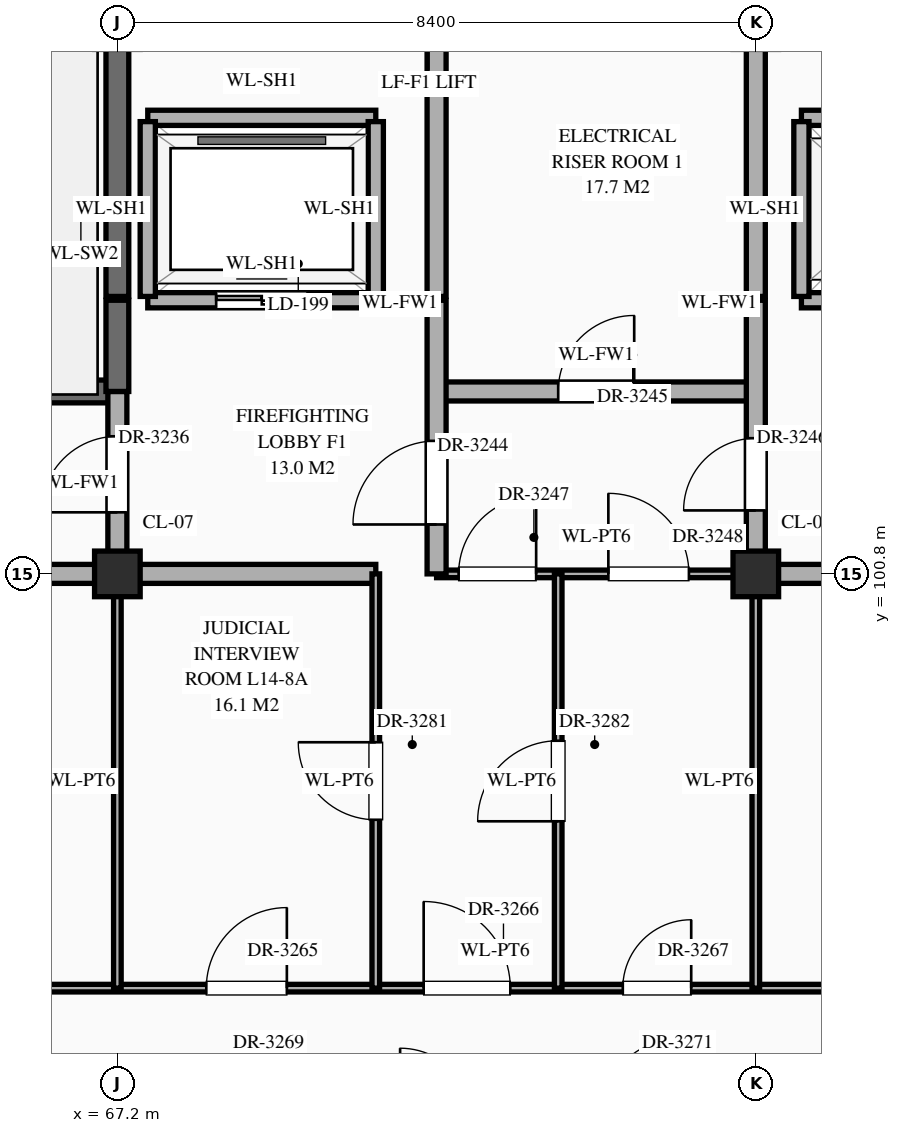
"""IFC4 building model, lengths in metres.
Left out: names, types, materials, properties, quantities, classifications, styles, units other than length and angle.
Written with IfcOpenShell. Run it as: python <this file> out.ifc"""

import sys

from ifc_helpers import new_model, si_unit, direction, frame, frame_2d, origin, origin_2d, place, context, subcontext, project, spatial, rectangle, extrude, element, fill, save


model = new_model("IFC4")
c1 = context("Model", 3, precision=1e-05, world=origin(), true_north=direction((0.0, 1.0)))
c2 = subcontext(c1, "Body", "Model", "MODEL_VIEW")
j1 = project(units=[si_unit("LENGTHUNIT", "METRE"), si_unit("PLANEANGLEUNIT", "RADIAN")], contexts=[c1])
p1 = place(None, origin())
s1 = spatial("IfcSite", under=j1, at=p1, CompositionType="ELEMENT")
p2 = place(p1, origin())
s2 = spatial("IfcBuilding", under=s1, at=p2, CompositionType="ELEMENT")
p3 = place(p2, frame((0.0, 0.0, 60.3)))
s3 = spatial("IfcBuildingStorey", under=s2, at=p3, CompositionType="ELEMENT", Elevation=60.3)
for number, where, z_axis, x_axis in (
    (1, (67.2, 100.8, 0.0), (0.0, 0.0, 1.0), (1.0, 0.0, 0.0)),
    (2, (75.6, 100.8, 0.0), (0.0, 0.0, 1.0), (1.0, 0.0, 0.0)),
):
    element("IfcColumn", number, at=place(p3, frame(where, z_axis=z_axis, x_axis=x_axis)), inside=s3, PredefinedType="COLUMN", context=c2, shape_type="SweptSolid", body=[
        extrude(rectangle(XDim=0.6, YDim=0.6, at=origin_2d()), origin(), (0.0, 0.0, 1.0), 4.2),
    ])
p4 = place(p3, frame((58.84, 95.35, 0.0), z_axis=(0.0, 0.0, 1.0), x_axis=(1.0, 0.0, 0.0)))
e3 = element("IfcWall", 3, at=p4, inside=s3, PredefinedType="STANDARD", context=c2, shape_type="SweptSolid", body=[
    extrude(rectangle(XDim=50.32, YDim=0.1, at=frame_2d((25.16, 0.0))), origin(), (0.0, 0.0, 1.0), 3.96),
])
p5 = place(p4, frame((3.67, 0.0, 0.0)))
e4 = element("IfcOpeningElement", 4, at=p5, cuts=e3, PredefinedType="OPENING", context=c2, shape_type="SweptSolid", body=[
    extrude(rectangle(XDim=1.02, YDim=2.4, at=frame_2d((0.51, 1.2))), frame((0.0, 0.062, 0.0), z_axis=(0.0, -1.0, 0.0), x_axis=(1.0, 0.0, 0.0)), (0.0, 0.0, 1.0), 0.124),
])
p6 = place(p4, frame((9.53, 0.0, 0.0)))
e5 = element("IfcOpeningElement", 5, at=p6, cuts=e3, PredefinedType="OPENING", context=c2, shape_type="SweptSolid", body=[
    extrude(rectangle(XDim=1.06, YDim=2.4, at=frame_2d((0.53, 1.2))), frame((0.0, 0.062, 0.0), z_axis=(0.0, -1.0, 0.0), x_axis=(1.0, 0.0, 0.0)), (0.0, 0.0, 1.0), 0.124),
])
p7 = place(p4, frame((12.39, 0.0, 0.0)))
e6 = element("IfcOpeningElement", 6, at=p7, cuts=e3, PredefinedType="OPENING", context=c2, shape_type="SweptSolid", body=[
    extrude(rectangle(XDim=1.14, YDim=2.4, at=frame_2d((0.57, 1.2))), frame((0.0, 0.062, 0.0), z_axis=(0.0, -1.0, 0.0), x_axis=(1.0, 0.0, 0.0)), (0.0, 0.0, 1.0), 0.124),
])
p8 = place(p4, frame((15.01, 0.0, 0.0)))
e7 = element("IfcOpeningElement", 7, at=p8, cuts=e3, PredefinedType="OPENING", context=c2, shape_type="SweptSolid", body=[
    extrude(rectangle(XDim=0.9, YDim=2.15, at=frame_2d((0.45, 1.075))), frame((0.0, 0.062, 0.0), z_axis=(0.0, -1.0, 0.0), x_axis=(1.0, 0.0, 0.0)), (0.0, 0.0, 1.0), 0.124),
])
p9 = place(p4, frame((20.53, 0.0, 0.0)))
e8 = element("IfcOpeningElement", 8, at=p9, cuts=e3, PredefinedType="OPENING", context=c2, shape_type="SweptSolid", body=[
    extrude(rectangle(XDim=0.86, YDim=2.1, at=frame_2d((0.43, 1.05))), frame((0.0, 0.062, 0.0), z_axis=(0.0, -1.0, 0.0), x_axis=(1.0, 0.0, 0.0)), (0.0, 0.0, 1.0), 0.124),
])
p10 = place(p4, frame((28.84, 0.0, 0.0)))
e9 = element("IfcOpeningElement", 9, at=p10, cuts=e3, PredefinedType="OPENING", context=c2, shape_type="SweptSolid", body=[
    extrude(rectangle(XDim=1.04, YDim=2.2, at=frame_2d((0.52, 1.1))), frame((0.0, 0.062, 0.0), z_axis=(0.0, -1.0, 0.0), x_axis=(1.0, 0.0, 0.0)), (0.0, 0.0, 1.0), 0.124),
])
p11 = place(p4, frame((34.72, 0.0, 0.0)))
e10 = element("IfcOpeningElement", 10, at=p11, cuts=e3, PredefinedType="OPENING", context=c2, shape_type="SweptSolid", body=[
    extrude(rectangle(XDim=1.08, YDim=2.25, at=frame_2d((0.54, 1.125))), frame((0.0, 0.062, 0.0), z_axis=(0.0, -1.0, 0.0), x_axis=(1.0, 0.0, 0.0)), (0.0, 0.0, 1.0), 0.124),
])
p12 = place(p4, frame((37.6, 0.0, 0.0)))
e11 = element("IfcOpeningElement", 11, at=p12, cuts=e3, PredefinedType="OPENING", context=c2, shape_type="SweptSolid", body=[
    extrude(rectangle(XDim=1.12, YDim=2.25, at=frame_2d((0.56, 1.125))), frame((0.0, 0.062, 0.0), z_axis=(0.0, -1.0, 0.0), x_axis=(1.0, 0.0, 0.0)), (0.0, 0.0, 1.0), 0.124),
])
p13 = place(p4, frame((40.08, 0.0, 0.0)))
e12 = element("IfcOpeningElement", 12, at=p13, cuts=e3, PredefinedType="OPENING", context=c2, shape_type="SweptSolid", body=[
    extrude(rectangle(XDim=1.16, YDim=2.3, at=frame_2d((0.58, 1.15))), frame((0.0, 0.062, 0.0), z_axis=(0.0, -1.0, 0.0), x_axis=(1.0, 0.0, 0.0)), (0.0, 0.0, 1.0), 0.124),
])
p14 = place(p4, frame((45.54, 0.0, 0.0)))
e13 = element("IfcOpeningElement", 13, at=p14, cuts=e3, PredefinedType="OPENING", context=c2, shape_type="SweptSolid", body=[
    extrude(rectangle(XDim=1.2, YDim=2.35, at=frame_2d((0.6, 1.175))), frame((0.0, 0.062, 0.0), z_axis=(0.0, -1.0, 0.0), x_axis=(1.0, 0.0, 0.0)), (0.0, 0.0, 1.0), 0.124),
])
p15 = place(p3, frame((58.84, 100.8, 0.0), z_axis=(0.0, 0.0, 1.0), x_axis=(1.0, 0.0, 0.0)))
e14 = element("IfcWall", 14, at=p15, inside=s3, PredefinedType="STANDARD", context=c2, shape_type="SweptSolid", body=[
    extrude(rectangle(XDim=11.76, YDim=0.25, at=frame_2d((5.88, 0.0))), origin(), (0.0, 0.0, 1.0), 3.11),
])
p16 = place(p15, frame((3.685, 0.0, 0.0)))
e15 = element("IfcOpeningElement", 15, at=p16, cuts=e14, PredefinedType="OPENING", context=c2, shape_type="SweptSolid", body=[
    extrude(rectangle(XDim=0.95, YDim=2.15, at=frame_2d((0.475, 1.075))), frame((0.0, 0.137, 0.0), z_axis=(0.0, -1.0, 0.0), x_axis=(1.0, 0.0, 0.0)), (0.0, 0.0, 1.0), 0.274),
])
p17 = place(p3, frame((71.4, 100.8, 0.0), z_axis=(0.0, 0.0, 1.0), x_axis=(1.0, 0.0, 0.0)))
e16 = element("IfcWall", 16, at=p17, inside=s3, PredefinedType="STANDARD", context=c2, shape_type="SweptSolid", body=[
    extrude(rectangle(XDim=4.2, YDim=0.1, at=frame_2d((2.1, 0.0))), origin(), (0.0, 0.0, 1.0), 3.11),
])
p18 = place(p17, frame((0.29, 0.0, 0.0)))
e17 = element("IfcOpeningElement", 17, at=p18, cuts=e16, PredefinedType="OPENING", context=c2, shape_type="SweptSolid", body=[
    extrude(rectangle(XDim=1.02, YDim=2.4, at=frame_2d((0.51, 1.2))), frame((0.0, 0.062, 0.0), z_axis=(0.0, -1.0, 0.0), x_axis=(1.0, 0.0, 0.0)), (0.0, 0.0, 1.0), 0.124),
])
p19 = place(p17, frame((2.26, 0.0, 0.0)))
e18 = element("IfcOpeningElement", 18, at=p19, cuts=e16, PredefinedType="OPENING", context=c2, shape_type="SweptSolid", body=[
    extrude(rectangle(XDim=1.06, YDim=2.4, at=frame_2d((0.53, 1.2))), frame((0.0, 0.062, 0.0), z_axis=(0.0, -1.0, 0.0), x_axis=(1.0, 0.0, 0.0)), (0.0, 0.0, 1.0), 0.124),
])
p20 = place(p3, frame((75.6, 100.8, 0.0), z_axis=(0.0, 0.0, 1.0), x_axis=(1.0, 0.0, 0.0)))
e19 = element("IfcWall", 19, at=p20, inside=s3, PredefinedType="STANDARD", context=c2, shape_type="SweptSolid", body=[
    extrude(rectangle(XDim=16.8, YDim=0.25, at=frame_2d((8.4, 0.0))), origin(), (0.0, 0.0, 1.0), 3.11),
])
p21 = place(p20, frame((3.725, 0.0, 0.0)))
e20 = element("IfcOpeningElement", 20, at=p21, cuts=e19, PredefinedType="OPENING", context=c2, shape_type="SweptSolid", body=[
    extrude(rectangle(XDim=0.95, YDim=2.15, at=frame_2d((0.475, 1.075))), frame((0.0, 0.137, 0.0), z_axis=(0.0, -1.0, 0.0), x_axis=(1.0, 0.0, 0.0)), (0.0, 0.0, 1.0), 0.274),
])
p22 = place(p20, frame((12.05, 0.0, 0.0)))
e21 = element("IfcOpeningElement", 21, at=p22, cuts=e19, PredefinedType="OPENING", context=c2, shape_type="SweptSolid", body=[
    extrude(rectangle(XDim=1.1, YDim=2.2, at=frame_2d((0.55, 1.1))), frame((0.0, 0.137, 0.0), z_axis=(0.0, -1.0, 0.0), x_axis=(1.0, 0.0, 0.0)), (0.0, 0.0, 1.0), 0.274),
])
p23 = place(p3, frame((58.84, 103.2, 0.0), z_axis=(0.0, 0.0, 1.0), x_axis=(1.0, 0.0, 0.0)))
e22 = element("IfcWall", 22, at=p23, inside=s3, PredefinedType="SHEAR", context=c2, shape_type="SweptSolid", body=[
    extrude(rectangle(XDim=8.36, YDim=0.3, at=frame_2d((4.18, 0.0))), origin(), (0.0, 0.0, 1.0), 3.96),
])
p24 = place(p23, frame((0.61, 0.0, 0.0)))
e23 = element("IfcOpeningElement", 23, at=p24, cuts=e22, PredefinedType="OPENING", context=c2, shape_type="SweptSolid", body=[
    extrude(rectangle(XDim=1.1, YDim=2.2, at=frame_2d((0.55, 1.1))), frame((0.0, 0.162, 0.0), z_axis=(0.0, -1.0, 0.0), x_axis=(1.0, 0.0, 0.0)), (0.0, 0.0, 1.0), 0.324),
])
p25 = place(p3, frame((71.4, 103.2, 0.0), z_axis=(0.0, 0.0, 1.0), x_axis=(1.0, 0.0, 0.0)))
e24 = element("IfcWall", 24, at=p25, inside=s3, PredefinedType="STANDARD", context=c2, shape_type="SweptSolid", body=[
    extrude(rectangle(XDim=4.2, YDim=0.25, at=frame_2d((2.1, 0.0))), origin(), (0.0, 0.0, 1.0), 3.96),
])
p26 = place(p25, frame((1.6, 0.0, 0.0)))
e25 = element("IfcOpeningElement", 25, at=p26, cuts=e24, PredefinedType="OPENING", context=c2, shape_type="SweptSolid", body=[
    extrude(rectangle(XDim=1.0, YDim=2.2, at=frame_2d((0.5, 1.1))), frame((0.0, 0.137, 0.0), z_axis=(0.0, -1.0, 0.0), x_axis=(1.0, 0.0, 0.0)), (0.0, 0.0, 1.0), 0.274),
])
p27 = place(p3, frame((67.6, 104.4, 0.0), z_axis=(0.0, 0.0, 1.0), x_axis=(1.0, 0.0, 0.0)))
e26 = element("IfcWall", 26, at=p27, inside=s3, PredefinedType="STANDARD", context=c2, shape_type="SweptSolid", body=[
    extrude(rectangle(XDim=3.0, YDim=0.2, at=frame_2d((1.5, 0.0))), origin(), (0.0, 0.0, 1.0), 3.96),
])
p28 = place(p27, frame((0.9, 0.0, 0.0)))
e27 = element("IfcOpeningElement", 27, at=p28, cuts=e26, PredefinedType="OPENING", context=c2, shape_type="SweptSolid", body=[
    extrude(rectangle(XDim=1.2, YDim=2.15, at=frame_2d((0.6, 1.075))), frame((0.0, 0.112, 0.0), z_axis=(0.0, -1.0, 0.0), x_axis=(1.0, 0.0, 0.0)), (0.0, 0.0, 1.0), 0.224),
])
p29 = place(p3, frame((76.2, 104.4, 0.0), z_axis=(0.0, 0.0, 1.0), x_axis=(1.0, 0.0, 0.0)))
e28 = element("IfcWall", 28, at=p29, inside=s3, PredefinedType="STANDARD", context=c2, shape_type="SweptSolid", body=[
    extrude(rectangle(XDim=2.4, YDim=0.2, at=frame_2d((1.2, 0.0))), origin(), (0.0, 0.0, 1.0), 3.96),
])
p30 = place(p29, frame((0.7, 0.0, 0.0)))
e29 = element("IfcOpeningElement", 29, at=p30, cuts=e28, PredefinedType="OPENING", context=c2, shape_type="SweptSolid", body=[
    extrude(rectangle(XDim=1.0, YDim=2.15, at=frame_2d((0.5, 1.075))), frame((0.0, 0.112, 0.0), z_axis=(0.0, -1.0, 0.0), x_axis=(1.0, 0.0, 0.0)), (0.0, 0.0, 1.0), 0.224),
])
p31 = place(p3, frame((67.6, 106.8, 0.0), z_axis=(0.0, 0.0, 1.0), x_axis=(1.0, 0.0, 0.0)))
e30 = element("IfcWall", 30, at=p31, inside=s3, PredefinedType="STANDARD", context=c2, shape_type="SweptSolid", body=[
    extrude(rectangle(XDim=3.0, YDim=0.2, at=frame_2d((1.5, 0.0))), origin(), (0.0, 0.0, 1.0), 3.96),
])
p32 = place(p3, frame((76.2, 106.8, 0.0), z_axis=(0.0, 0.0, 1.0), x_axis=(1.0, 0.0, 0.0)))
e31 = element("IfcWall", 31, at=p32, inside=s3, PredefinedType="STANDARD", context=c2, shape_type="SweptSolid", body=[
    extrude(rectangle(XDim=2.4, YDim=0.2, at=frame_2d((1.2, 0.0))), origin(), (0.0, 0.0, 1.0), 3.96),
])
p33 = place(p3, frame((67.2, 95.35, 0.0), z_axis=(0.0, 0.0, 1.0), x_axis=(0.0, 1.0, 0.0)))
e32 = element("IfcWall", 32, at=p33, inside=s3, PredefinedType="STANDARD", context=c2, shape_type="SweptSolid", body=[
    extrude(rectangle(XDim=5.45, YDim=0.1, at=frame_2d((2.725, 0.0))), origin(), (0.0, 0.0, 1.0), 3.21),
])
p34 = place(p3, frame((67.2, 100.8, 0.0), z_axis=(0.0, 0.0, 1.0), x_axis=(0.0, 1.0, 0.0)))
e33 = element("IfcWall", 33, at=p34, inside=s3, PredefinedType="STANDARD", context=c2, shape_type="SweptSolid", body=[
    extrude(rectangle(XDim=2.4, YDim=0.25, at=frame_2d((1.2, 0.0))), origin(), (0.0, 0.0, 1.0), 3.21),
])
p35 = place(p34, frame((0.81, 0.0, 0.0)))
e34 = element("IfcOpeningElement", 34, at=p35, cuts=e33, PredefinedType="OPENING", context=c2, shape_type="SweptSolid", body=[
    extrude(rectangle(XDim=1.0, YDim=2.2, at=frame_2d((0.5, 1.1))), frame((0.0, 0.137, 0.0), z_axis=(0.0, -1.0, 0.0), x_axis=(1.0, 0.0, 0.0)), (0.0, 0.0, 1.0), 0.274),
])
p36 = place(p3, frame((67.2, 103.2, 0.0), z_axis=(0.0, 0.0, 1.0), x_axis=(0.0, 1.0, 0.0)))
e35 = element("IfcWall", 35, at=p36, inside=s3, PredefinedType="SHEAR", context=c2, shape_type="SweptSolid", body=[
    extrude(rectangle(XDim=1.2, YDim=0.3, at=frame_2d((0.6, 0.0))), origin(), (0.0, 0.0, 1.0), 3.96),
])
p37 = place(p3, frame((67.2, 104.45, 0.0), z_axis=(0.0, 0.0, 1.0), x_axis=(0.0, 1.0, 0.0)))
e36 = element("IfcWall", 36, at=p37, inside=s3, PredefinedType="SHEAR", context=c2, shape_type="SweptSolid", body=[
    extrude(rectangle(XDim=3.46, YDim=0.3, at=frame_2d((1.73, 0.0))), origin(), (0.0, 0.0, 1.0), 3.96),
])
p38 = place(p3, frame((67.6, 104.45, 0.0), z_axis=(0.0, 0.0, 1.0), x_axis=(0.0, 1.0, 0.0)))
e37 = element("IfcWall", 37, at=p38, inside=s3, PredefinedType="STANDARD", context=c2, shape_type="SweptSolid", body=[
    extrude(rectangle(XDim=2.3, YDim=0.2, at=frame_2d((1.15, 0.0))), origin(), (0.0, 0.0, 1.0), 3.96),
])
p39 = place(p3, frame((70.6, 95.35, 0.0), z_axis=(0.0, 0.0, 1.0), x_axis=(0.0, 1.0, 0.0)))
e38 = element("IfcWall", 38, at=p39, inside=s3, PredefinedType="STANDARD", context=c2, shape_type="SweptSolid", body=[
    extrude(rectangle(XDim=5.45, YDim=0.1, at=frame_2d((2.725, 0.0))), origin(), (0.0, 0.0, 1.0), 3.96),
])
p40 = place(p39, frame((2.215, 0.0, 0.0)))
e39 = element("IfcOpeningElement", 39, at=p40, cuts=e38, PredefinedType="OPENING", context=c2, shape_type="SweptSolid", body=[
    extrude(rectangle(XDim=1.02, YDim=2.4, at=frame_2d((0.51, 1.2))), frame((0.0, 0.062, 0.0), z_axis=(0.0, -1.0, 0.0), x_axis=(1.0, 0.0, 0.0)), (0.0, 0.0, 1.0), 0.124),
])
p41 = place(p3, frame((70.6, 104.45, 0.0), z_axis=(0.0, 0.0, 1.0), x_axis=(0.0, 1.0, 0.0)))
e40 = element("IfcWall", 40, at=p41, inside=s3, PredefinedType="STANDARD", context=c2, shape_type="SweptSolid", body=[
    extrude(rectangle(XDim=2.3, YDim=0.2, at=frame_2d((1.15, 0.0))), origin(), (0.0, 0.0, 1.0), 3.96),
])
p42 = place(p3, frame((71.4, 100.8, 0.0), z_axis=(0.0, 0.0, 1.0), x_axis=(0.0, 1.0, 0.0)))
e41 = element("IfcWall", 41, at=p42, inside=s3, PredefinedType="STANDARD", context=c2, shape_type="SweptSolid", body=[
    extrude(rectangle(XDim=3.6, YDim=0.25, at=frame_2d((1.8, 0.0))), origin(), (0.0, 0.0, 1.0), 3.61),
])
p43 = place(p42, frame((0.65, 0.0, 0.0)))
e42 = element("IfcOpeningElement", 42, at=p43, cuts=e41, PredefinedType="OPENING", context=c2, shape_type="SweptSolid", body=[
    extrude(rectangle(XDim=1.1, YDim=2.2, at=frame_2d((0.55, 1.1))), frame((0.0, 0.137, 0.0), z_axis=(0.0, -1.0, 0.0), x_axis=(1.0, 0.0, 0.0)), (0.0, 0.0, 1.0), 0.274),
])
p44 = place(p3, frame((71.4, 104.45, 0.0), z_axis=(0.0, 0.0, 1.0), x_axis=(0.0, 1.0, 0.0)))
e43 = element("IfcWall", 43, at=p44, inside=s3, PredefinedType="STANDARD", context=c2, shape_type="SweptSolid", body=[
    extrude(rectangle(XDim=3.46, YDim=0.25, at=frame_2d((1.73, 0.0))), origin(), (0.0, 0.0, 1.0), 3.61),
])
p45 = place(p3, frame((73.0, 95.35, 0.0), z_axis=(0.0, 0.0, 1.0), x_axis=(0.0, 1.0, 0.0)))
e44 = element("IfcWall", 44, at=p45, inside=s3, PredefinedType="STANDARD", context=c2, shape_type="SweptSolid", body=[
    extrude(rectangle(XDim=5.45, YDim=0.1, at=frame_2d((2.725, 0.0))), origin(), (0.0, 0.0, 1.0), 3.96),
])
p46 = place(p45, frame((2.195, 0.0, 0.0)))
e45 = element("IfcOpeningElement", 45, at=p46, cuts=e44, PredefinedType="OPENING", context=c2, shape_type="SweptSolid", body=[
    extrude(rectangle(XDim=1.06, YDim=2.4, at=frame_2d((0.53, 1.2))), frame((0.0, 0.062, 0.0), z_axis=(0.0, -1.0, 0.0), x_axis=(1.0, 0.0, 0.0)), (0.0, 0.0, 1.0), 0.124),
])
p47 = place(p3, frame((75.6, 95.35, 0.0), z_axis=(0.0, 0.0, 1.0), x_axis=(0.0, 1.0, 0.0)))
e46 = element("IfcWall", 46, at=p47, inside=s3, PredefinedType="STANDARD", context=c2, shape_type="SweptSolid", body=[
    extrude(rectangle(XDim=5.45, YDim=0.1, at=frame_2d((2.725, 0.0))), origin(), (0.0, 0.0, 1.0), 3.21),
])
p48 = place(p3, frame((75.6, 100.8, 0.0), z_axis=(0.0, 0.0, 1.0), x_axis=(0.0, 1.0, 0.0)))
e47 = element("IfcWall", 47, at=p48, inside=s3, PredefinedType="STANDARD", context=c2, shape_type="SweptSolid", body=[
    extrude(rectangle(XDim=3.6, YDim=0.25, at=frame_2d((1.8, 0.0))), origin(), (0.0, 0.0, 1.0), 3.21),
])
p49 = place(p48, frame((0.835, 0.0, 0.0)))
e48 = element("IfcOpeningElement", 48, at=p49, cuts=e47, PredefinedType="OPENING", context=c2, shape_type="SweptSolid", body=[
    extrude(rectangle(XDim=0.95, YDim=2.15, at=frame_2d((0.475, 1.075))), frame((0.0, 0.137, 0.0), z_axis=(0.0, -1.0, 0.0), x_axis=(1.0, 0.0, 0.0)), (0.0, 0.0, 1.0), 0.274),
])
p50 = place(p3, frame((75.6, 104.45, 0.0), z_axis=(0.0, 0.0, 1.0), x_axis=(0.0, 1.0, 0.0)))
e49 = element("IfcWall", 49, at=p50, inside=s3, PredefinedType="STANDARD", context=c2, shape_type="SweptSolid", body=[
    extrude(rectangle(XDim=3.46, YDim=0.25, at=frame_2d((1.73, 0.0))), origin(), (0.0, 0.0, 1.0), 3.21),
])
p51 = place(p3, frame((76.2, 104.45, 0.0), z_axis=(0.0, 0.0, 1.0), x_axis=(0.0, 1.0, 0.0)))
e50 = element("IfcWall", 50, at=p51, inside=s3, PredefinedType="STANDARD", context=c2, shape_type="SweptSolid", body=[
    extrude(rectangle(XDim=2.3, YDim=0.2, at=frame_2d((1.15, 0.0))), origin(), (0.0, 0.0, 1.0), 3.96),
])
p52 = place(p28, origin())
e51 = element("IfcDoor", 51, at=p52, inside=s3, OperationType="DOUBLE_DOOR_SLIDING", PredefinedType="DOOR", context=c2, shape_type="SweptSolid", body=[
    extrude(rectangle(XDim=1.2, YDim=2.15, at=frame_2d((0.6, 1.075))), frame((0.0, 0.025, 0.0), z_axis=(0.0, -1.0, 0.0), x_axis=(1.0, 0.0, 0.0)), (0.0, 0.0, 1.0), 0.05),
])
fill(e27, e51)
p53 = place(p35, origin())
e52 = element("IfcDoor", 52, at=p53, inside=s3, OperationType="SINGLE_SWING_LEFT", PredefinedType="DOOR", context=c2, shape_type="SweptSolid", body=[
    extrude(rectangle(XDim=1.0, YDim=2.2, at=frame_2d((0.5, 1.1))), frame((0.0, 0.025, 0.0), z_axis=(0.0, -1.0, 0.0), x_axis=(1.0, 0.0, 0.0)), (0.0, 0.0, 1.0), 0.05),
])
fill(e34, e52)
p54 = place(p43, origin())
e53 = element("IfcDoor", 53, at=p54, inside=s3, OperationType="SINGLE_SWING_LEFT", PredefinedType="DOOR", context=c2, shape_type="SweptSolid", body=[
    extrude(rectangle(XDim=1.1, YDim=2.2, at=frame_2d((0.55, 1.1))), frame((0.0, 0.025, 0.0), z_axis=(0.0, -1.0, 0.0), x_axis=(1.0, 0.0, 0.0)), (0.0, 0.0, 1.0), 0.05),
])
fill(e42, e53)
p55 = place(p26, origin())
e54 = element("IfcDoor", 54, at=p55, inside=s3, OperationType="SINGLE_SWING_RIGHT", PredefinedType="DOOR", context=c2, shape_type="SweptSolid", body=[
    extrude(rectangle(XDim=1.0, YDim=2.2, at=frame_2d((0.5, 1.1))), frame((0.0, 0.025, 0.0), z_axis=(0.0, -1.0, 0.0), x_axis=(1.0, 0.0, 0.0)), (0.0, 0.0, 1.0), 0.05),
])
fill(e25, e54)
p56 = place(p49, origin())
e55 = element("IfcDoor", 55, at=p56, inside=s3, OperationType="SINGLE_SWING_LEFT", PredefinedType="DOOR", context=c2, shape_type="SweptSolid", body=[
    extrude(rectangle(XDim=0.95, YDim=2.15, at=frame_2d((0.475, 1.075))), frame((0.0, 0.025, 0.0), z_axis=(0.0, -1.0, 0.0), x_axis=(1.0, 0.0, 0.0)), (0.0, 0.0, 1.0), 0.05),
])
fill(e48, e55)
p57 = place(p18, origin())
e56 = element("IfcDoor", 56, at=p57, inside=s3, OperationType="SINGLE_SWING_RIGHT", PredefinedType="DOOR", context=c2, shape_type="SweptSolid", body=[
    extrude(rectangle(XDim=1.02, YDim=2.4, at=frame_2d((0.51, 1.2))), frame((0.0, 0.025, 0.0), z_axis=(0.0, -1.0, 0.0), x_axis=(1.0, 0.0, 0.0)), (0.0, 0.0, 1.0), 0.05),
])
fill(e17, e56)
p58 = place(p19, origin())
e57 = element("IfcDoor", 57, at=p58, inside=s3, OperationType="SINGLE_SWING_LEFT", PredefinedType="DOOR", context=c2, shape_type="SweptSolid", body=[
    extrude(rectangle(XDim=1.06, YDim=2.4, at=frame_2d((0.53, 1.2))), frame((0.0, 0.025, 0.0), z_axis=(0.0, -1.0, 0.0), x_axis=(1.0, 0.0, 0.0)), (0.0, 0.0, 1.0), 0.05),
])
fill(e18, e57)
p59 = place(p6, origin())
e58 = element("IfcDoor", 58, at=p59, inside=s3, OperationType="SINGLE_SWING_RIGHT", PredefinedType="DOOR", context=c2, shape_type="SweptSolid", body=[
    extrude(rectangle(XDim=1.06, YDim=2.4, at=frame_2d((0.53, 1.2))), frame((0.0, 0.025, 0.0), z_axis=(0.0, -1.0, 0.0), x_axis=(1.0, 0.0, 0.0)), (0.0, 0.0, 1.0), 0.05),
])
fill(e5, e58)
p60 = place(p7, origin())
e59 = element("IfcDoor", 59, at=p60, inside=s3, OperationType="SINGLE_SWING_LEFT", PredefinedType="DOOR", context=c2, shape_type="SweptSolid", body=[
    extrude(rectangle(XDim=1.14, YDim=2.4, at=frame_2d((0.57, 1.2))), frame((0.0, 0.025, 0.0), z_axis=(0.0, -1.0, 0.0), x_axis=(1.0, 0.0, 0.0)), (0.0, 0.0, 1.0), 0.05),
])
fill(e6, e59)
p61 = place(p8, origin())
e60 = element("IfcDoor", 60, at=p61, inside=s3, OperationType="SINGLE_SWING_RIGHT", PredefinedType="DOOR", context=c2, shape_type="SweptSolid", body=[
    extrude(rectangle(XDim=0.9, YDim=2.15, at=frame_2d((0.45, 1.075))), frame((0.0, 0.025, 0.0), z_axis=(0.0, -1.0, 0.0), x_axis=(1.0, 0.0, 0.0)), (0.0, 0.0, 1.0), 0.05),
])
fill(e7, e60)
p62 = place(p40, origin())
e61 = element("IfcDoor", 61, at=p62, inside=s3, OperationType="SINGLE_SWING_RIGHT", PredefinedType="DOOR", context=c2, shape_type="SweptSolid", body=[
    extrude(rectangle(XDim=1.02, YDim=2.4, at=frame_2d((0.51, 1.2))), frame((0.0, 0.025, 0.0), z_axis=(0.0, -1.0, 0.0), x_axis=(1.0, 0.0, 0.0)), (0.0, 0.0, 1.0), 0.05),
])
fill(e39, e61)
p63 = place(p46, origin())
e62 = element("IfcDoor", 62, at=p63, inside=s3, OperationType="SINGLE_SWING_LEFT", PredefinedType="DOOR", context=c2, shape_type="SweptSolid", body=[
    extrude(rectangle(XDim=1.06, YDim=2.4, at=frame_2d((0.53, 1.2))), frame((0.0, 0.025, 0.0), z_axis=(0.0, -1.0, 0.0), x_axis=(1.0, 0.0, 0.0)), (0.0, 0.0, 1.0), 0.05),
])
fill(e45, e62)
save(model, sys.argv[1])
